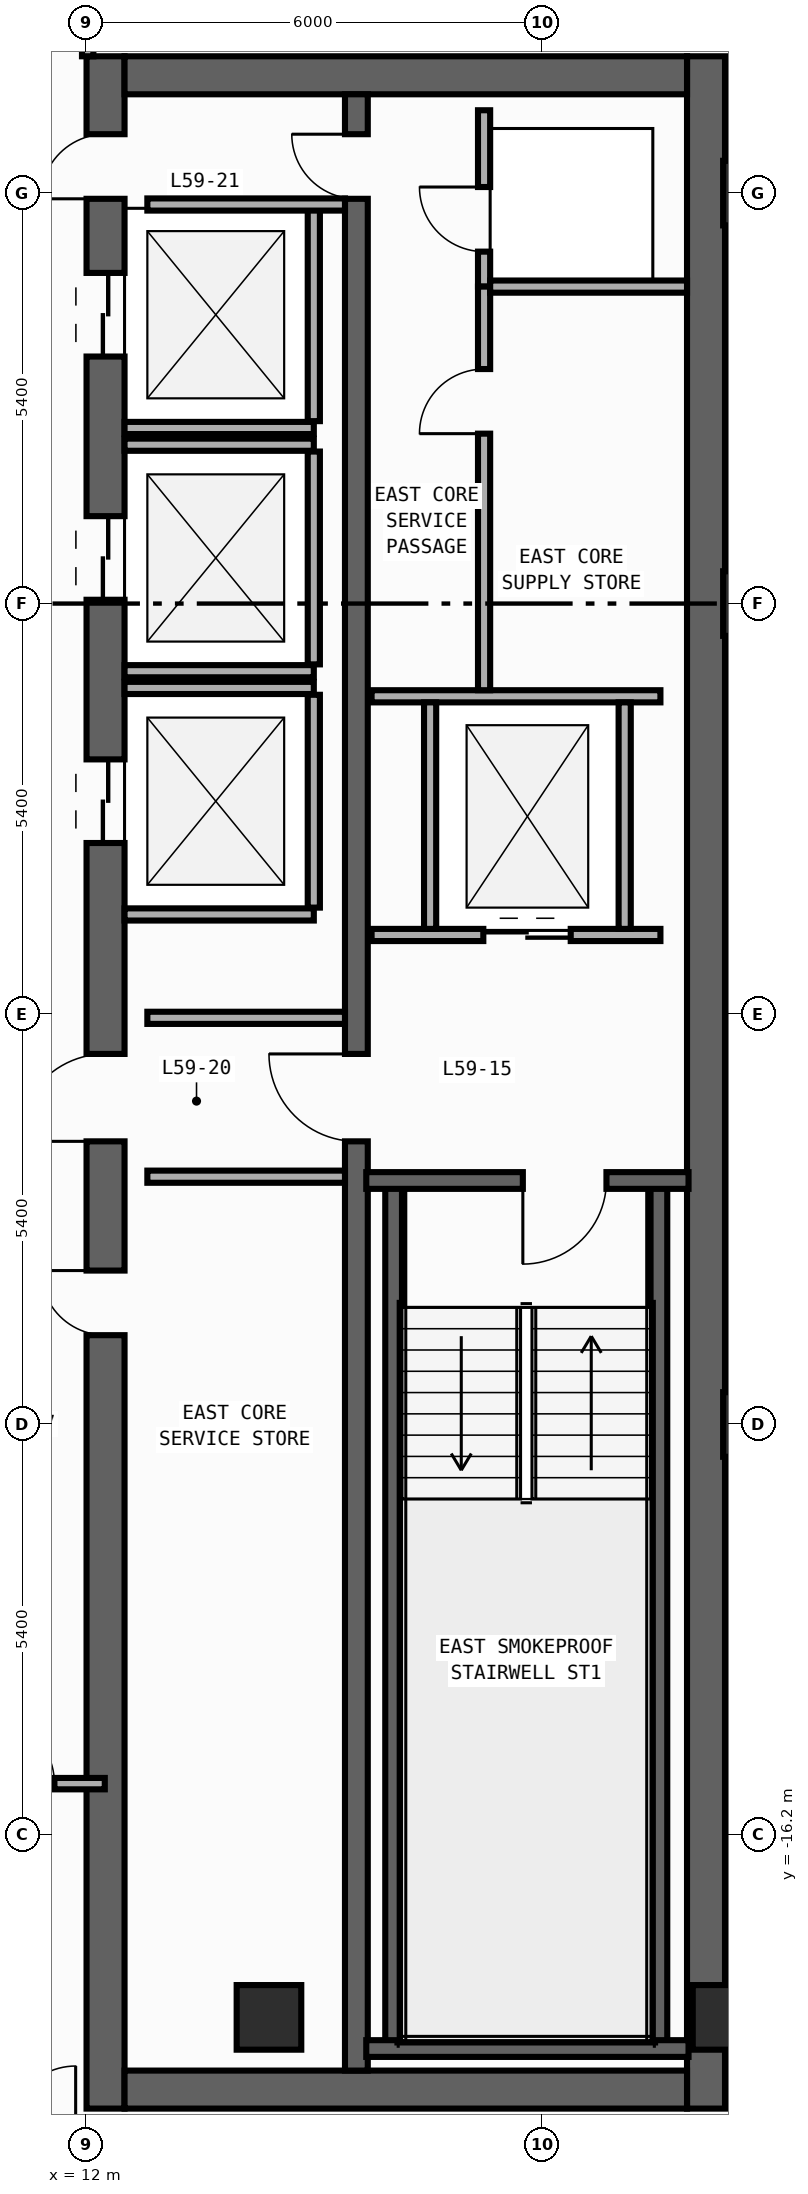
"""IFC4 building model, lengths in metres.
Left out: names, types, materials, properties, quantities, classifications, styles, units other than length and angle.
Written with IfcOpenShell. Run it as: python <this file> out.ifc"""

import sys

from ifc_helpers import new_model, si_unit, direction, frame, frame_2d, origin, origin_2d, place, context, subcontext, project, spatial, rectangle, extrude, element, fill, save


model = new_model("IFC4")
c1 = context("Model", 3, precision=1e-05, world=origin(), true_north=direction((0.0, 1.0)))
c2 = subcontext(c1, "Body", "Model", "MODEL_VIEW")
j1 = project(units=[si_unit("LENGTHUNIT", "METRE"), si_unit("PLANEANGLEUNIT", "RADIAN")], contexts=[c1])
p1 = place(None, origin())
s1 = spatial("IfcSite", under=j1, at=p1, CompositionType="ELEMENT")
p2 = place(p1, origin())
s2 = spatial("IfcBuilding", under=s1, at=p2, CompositionType="ELEMENT")
p3 = place(p2, frame((0.0, 0.0, 251.2)))
s3 = spatial("IfcBuildingStorey", under=s2, at=p3, CompositionType="ELEMENT", Elevation=251.2)
p4 = place(p3, frame((12.25, -19.8, 0.0), z_axis=(0.0, 0.0, 1.0), x_axis=(0.0, 1.0, 0.0)))
e1 = element("IfcWall", 1, at=p4, inside=s3, PredefinedType="SHEAR", context=c2, shape_type="SweptSolid", body=[
    extrude(rectangle(XDim=27.0, YDim=0.5, at=frame_2d((13.5, 0.0))), origin(), (0.0, 0.0, 1.0), 3.34),
])
p5 = place(p4, frame((23.05, 0.0, 0.0)))
e2 = element("IfcOpeningElement", 2, at=p5, cuts=e1, PredefinedType="OPENING", context=c2, shape_type="SweptSolid", body=[
    extrude(rectangle(XDim=1.1, YDim=2.2, at=frame_2d((0.55, 1.1))), frame((0.0, 0.26, 0.0), z_axis=(0.0, -1.0, 0.0), x_axis=(1.0, 0.0, 0.0)), (0.0, 0.0, 1.0), 0.52),
])
p6 = place(p4, frame((19.85, 0.0, 0.0)))
e3 = element("IfcOpeningElement", 3, at=p6, cuts=e1, PredefinedType="OPENING", context=c2, shape_type="SweptSolid", body=[
    extrude(rectangle(XDim=1.1, YDim=2.2, at=frame_2d((0.55, 1.1))), frame((0.0, 0.26, 0.0), z_axis=(0.0, -1.0, 0.0), x_axis=(1.0, 0.0, 0.0)), (0.0, 0.0, 1.0), 0.52),
])
p7 = place(p4, frame((16.65, 0.0, 0.0)))
e4 = element("IfcOpeningElement", 4, at=p7, cuts=e1, PredefinedType="OPENING", context=c2, shape_type="SweptSolid", body=[
    extrude(rectangle(XDim=1.1, YDim=2.2, at=frame_2d((0.55, 1.1))), frame((0.0, 0.26, 0.0), z_axis=(0.0, -1.0, 0.0), x_axis=(1.0, 0.0, 0.0)), (0.0, 0.0, 1.0), 0.52),
])
p8 = place(p4, frame((10.175, 0.0, 0.0)))
e5 = element("IfcOpeningElement", 5, at=p8, cuts=e1, PredefinedType="OPENING", context=c2, shape_type="SweptSolid", body=[
    extrude(rectangle(XDim=0.85, YDim=2.1, at=frame_2d((0.425, 1.05))), frame((0.0, 0.26, 0.0), z_axis=(0.0, -1.0, 0.0), x_axis=(1.0, 0.0, 0.0)), (0.0, 0.0, 1.0), 0.52),
])
p9 = place(p4, frame((12.725, 0.0, 0.0)))
e6 = element("IfcOpeningElement", 6, at=p9, cuts=e1, PredefinedType="OPENING", context=c2, shape_type="SweptSolid", body=[
    extrude(rectangle(XDim=1.15, YDim=2.2, at=frame_2d((0.575, 1.1))), frame((0.0, 0.26, 0.0), z_axis=(0.0, -1.0, 0.0), x_axis=(1.0, 0.0, 0.0)), (0.0, 0.0, 1.0), 0.52),
])
p10 = place(p4, frame((25.125, 0.0, 0.0)))
e7 = element("IfcOpeningElement", 7, at=p10, cuts=e1, PredefinedType="OPENING", context=c2, shape_type="SweptSolid", body=[
    extrude(rectangle(XDim=0.85, YDim=2.1, at=frame_2d((0.425, 1.05))), frame((0.0, 0.26, 0.0), z_axis=(0.0, -1.0, 0.0), x_axis=(1.0, 0.0, 0.0)), (0.0, 0.0, 1.0), 0.52),
])
p11 = place(p3, frame((20.15, -19.8, 0.0), z_axis=(0.0, 0.0, 1.0), x_axis=(0.0, 1.0, 0.0)))
e8 = element("IfcWall", 8, at=p11, inside=s3, PredefinedType="SHEAR", context=c2, shape_type="SweptSolid", body=[
    extrude(rectangle(XDim=27.0, YDim=0.5, at=frame_2d((13.5, 0.0))), origin(), (0.0, 0.0, 1.0), 3.34),
])
for number, where, z_axis, x_axis in (
    (9, (12.5, -19.55, 0.0), (0.0, 0.0, 1.0), (1.0, 0.0, 0.0)),
    (10, (12.5, 6.95, 0.0), (0.0, 0.0, 1.0), (1.0, 0.0, 0.0)),
):
    element("IfcWall", number, at=place(p3, frame(where, z_axis=z_axis, x_axis=x_axis)), inside=s3, PredefinedType="SHEAR", context=c2, shape_type="SweptSolid", body=[
        extrude(rectangle(XDim=7.4, YDim=0.5, at=frame_2d((3.7, 0.0))), origin(), (0.0, 0.0, 1.0), 3.34),
    ])
p12 = place(p3, frame((15.55, -19.3, 0.0), z_axis=(0.0, 0.0, 1.0), x_axis=(0.0, 1.0, 0.0)))
e11 = element("IfcWall", 11, at=p12, inside=s3, PredefinedType="SHEAR", context=c2, shape_type="SweptSolid", body=[
    extrude(rectangle(XDim=26.0, YDim=0.3, at=frame_2d((13.0, 0.0))), origin(), (0.0, 0.0, 1.0), 3.34),
])
p13 = place(p12, frame((12.225, 0.0, 0.0)))
e12 = element("IfcOpeningElement", 12, at=p13, cuts=e11, PredefinedType="OPENING", context=c2, shape_type="SweptSolid", body=[
    extrude(rectangle(XDim=1.15, YDim=2.2, at=frame_2d((0.575, 1.1))), frame((0.0, 0.16, 0.0), z_axis=(0.0, -1.0, 0.0), x_axis=(1.0, 0.0, 0.0)), (0.0, 0.0, 1.0), 0.32),
])
p14 = place(p12, frame((24.625, 0.0, 0.0)))
e13 = element("IfcOpeningElement", 13, at=p14, cuts=e11, PredefinedType="OPENING", context=c2, shape_type="SweptSolid", body=[
    extrude(rectangle(XDim=0.85, YDim=2.1, at=frame_2d((0.425, 1.05))), frame((0.0, 0.16, 0.0), z_axis=(0.0, -1.0, 0.0), x_axis=(1.0, 0.0, 0.0)), (0.0, 0.0, 1.0), 0.32),
])
for number, where, z_axis, x_axis in (
    (14, (16.04, -19.01, 0.0), (0.0, 0.0, 1.0), (0.0, 1.0, 0.0)),
    (15, (19.53, -19.01, 0.0), (0.0, 0.0, 1.0), (0.0, 1.0, 0.0)),
):
    element("IfcWall", number, at=place(p3, frame(where, z_axis=z_axis, x_axis=x_axis)), inside=s3, PredefinedType="SHEAR", context=c2, shape_type="SweptSolid", body=[
        extrude(rectangle(XDim=11.42, YDim=0.22, at=frame_2d((5.71, 0.0))), origin(), (0.0, 0.0, 1.0), 3.34),
    ])
p15 = place(p3, frame((15.68, -19.01, 0.0), z_axis=(0.0, 0.0, 1.0), x_axis=(1.0, 0.0, 0.0)))
e16 = element("IfcWall", 16, at=p15, inside=s3, PredefinedType="SHEAR", context=c2, shape_type="SweptSolid", body=[
    extrude(rectangle(XDim=4.24, YDim=0.22, at=frame_2d((2.12, 0.0))), origin(), (0.0, 0.0, 1.0), 3.34),
])
p16 = place(p3, frame((19.92, -7.59, 0.0), z_axis=(0.0, 0.0, 1.0), x_axis=(-1.0, 0.0, 0.0)))
e17 = element("IfcWall", 17, at=p16, inside=s3, PredefinedType="SHEAR", context=c2, shape_type="SweptSolid", body=[
    extrude(rectangle(XDim=4.24, YDim=0.22, at=frame_2d((2.12, 0.0))), origin(), (0.0, 0.0, 1.0), 3.34),
])
p17 = place(p16, frame((1.08, 0.0, 0.0)))
e18 = element("IfcOpeningElement", 18, at=p17, cuts=e17, PredefinedType="OPENING", context=c2, shape_type="SweptSolid", body=[
    extrude(rectangle(XDim=1.1, YDim=2.2, at=frame_2d((0.55, 1.1))), frame((0.0, 0.12, 0.0), z_axis=(0.0, -1.0, 0.0), x_axis=(1.0, 0.0, 0.0)), (0.0, 0.0, 1.0), 0.24),
])
for number, where, z_axis, x_axis in (
    (19, (20.4, -18.6, 0.0), (0.0, 0.0, 1.0), (1.0, 0.0, 0.0)),
    (20, (14.4, -18.6, 0.0), (0.0, 0.0, 1.0), (1.0, 0.0, 0.0)),
    (21, (20.8, -10.8, 0.0), (0.0, 0.0, 1.0), (1.0, 0.0, 0.0)),
    (22, (20.8, 0.0, 0.0), (0.0, 0.0, 1.0), (1.0, 0.0, 0.0)),
    (23, (20.8, 5.4, 0.0), (0.0, 0.0, 1.0), (1.0, 0.0, 0.0)),
):
    element("IfcColumn", number, at=place(p3, frame(where, z_axis=z_axis, x_axis=x_axis)), inside=s3, PredefinedType="COLUMN", context=c2, shape_type="SweptSolid", body=[
        extrude(rectangle(XDim=0.85, YDim=0.85, at=origin_2d()), origin(), (0.0, 0.0, 1.0), 3.6),
    ])
p18 = place(p3, frame((12.5, 2.31, 0.0), z_axis=(0.0, 0.0, 1.0), x_axis=(1.0, 0.0, 0.0)))
e24 = element("IfcWall", 24, at=p18, inside=s3, PredefinedType="STANDARD", context=c2, shape_type="SweptSolid", body=[
    extrude(rectangle(XDim=2.49, YDim=0.16, at=frame_2d((1.245, 0.0))), origin(), (0.0, 0.0, 1.0), 3.34),
])
p19 = place(p3, frame((14.99, 2.4, 0.0), z_axis=(0.0, 0.0, 1.0), x_axis=(0.0, 1.0, 0.0)))
e25 = element("IfcWall", 25, at=p19, inside=s3, PredefinedType="STANDARD", context=c2, shape_type="SweptSolid", body=[
    extrude(rectangle(XDim=2.8, YDim=0.16, at=frame_2d((1.4, 0.0))), origin(), (0.0, 0.0, 1.0), 3.34),
])
for number, where, z_axis, x_axis in (
    (26, (12.5, -0.89, 0.0), (0.0, 0.0, 1.0), (1.0, 0.0, 0.0)),
    (27, (12.5, 2.09, 0.0), (0.0, 0.0, 1.0), (1.0, 0.0, 0.0)),
):
    element("IfcWall", number, at=place(p3, frame(where, z_axis=z_axis, x_axis=x_axis)), inside=s3, PredefinedType="STANDARD", context=c2, shape_type="SweptSolid", body=[
        extrude(rectangle(XDim=2.49, YDim=0.16, at=frame_2d((1.245, 0.0))), origin(), (0.0, 0.0, 1.0), 3.34),
    ])
p20 = place(p3, frame((14.99, -0.8, 0.0), z_axis=(0.0, 0.0, 1.0), x_axis=(0.0, 1.0, 0.0)))
e28 = element("IfcWall", 28, at=p20, inside=s3, PredefinedType="STANDARD", context=c2, shape_type="SweptSolid", body=[
    extrude(rectangle(XDim=2.8, YDim=0.16, at=frame_2d((1.4, 0.0))), origin(), (0.0, 0.0, 1.0), 3.34),
])
for number, where, z_axis, x_axis in (
    (29, (12.5, -4.09, 0.0), (0.0, 0.0, 1.0), (1.0, 0.0, 0.0)),
    (30, (12.5, -1.11, 0.0), (0.0, 0.0, 1.0), (1.0, 0.0, 0.0)),
):
    element("IfcWall", number, at=place(p3, frame(where, z_axis=z_axis, x_axis=x_axis)), inside=s3, PredefinedType="STANDARD", context=c2, shape_type="SweptSolid", body=[
        extrude(rectangle(XDim=2.49, YDim=0.16, at=frame_2d((1.245, 0.0))), origin(), (0.0, 0.0, 1.0), 3.34),
    ])
p21 = place(p3, frame((14.99, -4.0, 0.0), z_axis=(0.0, 0.0, 1.0), x_axis=(0.0, 1.0, 0.0)))
e31 = element("IfcWall", 31, at=p21, inside=s3, PredefinedType="STANDARD", context=c2, shape_type="SweptSolid", body=[
    extrude(rectangle(XDim=2.8, YDim=0.16, at=frame_2d((1.4, 0.0))), origin(), (0.0, 0.0, 1.0), 3.34),
])
p22 = place(p3, frame((15.75, -4.36, 0.0), z_axis=(0.0, 0.0, 1.0), x_axis=(1.0, 0.0, 0.0)))
e32 = element("IfcWall", 32, at=p22, inside=s3, PredefinedType="STANDARD", context=c2, shape_type="SweptSolid", body=[
    extrude(rectangle(XDim=3.8, YDim=0.16, at=frame_2d((1.9, 0.0))), origin(), (0.0, 0.0, 1.0), 3.34),
])
p23 = place(p22, frame((1.47, 0.0, 0.0)))
e33 = element("IfcOpeningElement", 33, at=p23, cuts=e32, PredefinedType="OPENING", context=c2, shape_type="SweptSolid", body=[
    extrude(rectangle(XDim=1.15, YDim=2.2, at=frame_2d((0.575, 1.1))), frame((0.0, 0.09, 0.0), z_axis=(0.0, -1.0, 0.0), x_axis=(1.0, 0.0, 0.0)), (0.0, 0.0, 1.0), 0.18),
])
p24 = place(p3, frame((15.75, -1.22, 0.0), z_axis=(0.0, 0.0, 1.0), x_axis=(1.0, 0.0, 0.0)))
e34 = element("IfcWall", 34, at=p24, inside=s3, PredefinedType="STANDARD", context=c2, shape_type="SweptSolid", body=[
    extrude(rectangle(XDim=3.8, YDim=0.16, at=frame_2d((1.9, 0.0))), origin(), (0.0, 0.0, 1.0), 3.34),
])
for number, where, z_axis, x_axis in (
    (35, (16.52, -4.28, 0.0), (0.0, 0.0, 1.0), (0.0, 1.0, 0.0)),
    (36, (19.08, -4.28, 0.0), (0.0, 0.0, 1.0), (0.0, 1.0, 0.0)),
):
    element("IfcWall", number, at=place(p3, frame(where, z_axis=z_axis, x_axis=x_axis)), inside=s3, PredefinedType="STANDARD", context=c2, shape_type="SweptSolid", body=[
        extrude(rectangle(XDim=2.98, YDim=0.16, at=frame_2d((1.49, 0.0))), origin(), (0.0, 0.0, 1.0), 3.34),
    ])
for number, where, z_axis, x_axis in (
    (37, (12.8, -5.45, 0.0), (0.0, 0.0, 1.0), (1.0, 0.0, 0.0)),
    (38, (12.8, -7.54, 0.0), (0.0, 0.0, 1.0), (1.0, 0.0, 0.0)),
    (39, (12.8, 5.25, 0.0), (0.0, 0.0, 1.0), (1.0, 0.0, 0.0)),
):
    element("IfcWall", number, at=place(p3, frame(where, z_axis=z_axis, x_axis=x_axis)), inside=s3, PredefinedType="STANDARD", context=c2, shape_type="SweptSolid", body=[
        extrude(rectangle(XDim=2.6, YDim=0.16, at=frame_2d((1.3, 0.0))), origin(), (0.0, 0.0, 1.0), 3.34),
    ])
p25 = place(p3, frame((17.23, 4.17, 0.0), z_axis=(0.0, 0.0, 1.0), x_axis=(0.0, 1.0, 0.0)))
e40 = element("IfcWall", 40, at=p25, inside=s3, PredefinedType="PARTITIONING", context=c2, shape_type="SweptSolid", body=[
    extrude(rectangle(XDim=2.32, YDim=0.16, at=frame_2d((1.16, 0.0))), origin(), (0.0, 0.0, 1.0), 3.34),
])
p26 = place(p25, frame((0.46, 0.0, 0.0)))
e41 = element("IfcOpeningElement", 41, at=p26, cuts=e40, PredefinedType="OPENING", context=c2, shape_type="SweptSolid", body=[
    extrude(rectangle(XDim=0.85, YDim=2.1, at=frame_2d((0.425, 1.05))), frame((0.0, 0.09, 0.0), z_axis=(0.0, -1.0, 0.0), x_axis=(1.0, 0.0, 0.0)), (0.0, 0.0, 1.0), 0.18),
])
p27 = place(p3, frame((17.23, -1.14, 0.0), z_axis=(0.0, 0.0, 1.0), x_axis=(0.0, 1.0, 0.0)))
e42 = element("IfcWall", 42, at=p27, inside=s3, PredefinedType="PARTITIONING", context=c2, shape_type="SweptSolid", body=[
    extrude(rectangle(XDim=5.31, YDim=0.16, at=frame_2d((2.655, 0.0))), origin(), (0.0, 0.0, 1.0), 3.34),
])
p28 = place(p27, frame((3.375, 0.0, 0.0)))
e43 = element("IfcOpeningElement", 43, at=p28, cuts=e42, PredefinedType="OPENING", context=c2, shape_type="SweptSolid", body=[
    extrude(rectangle(XDim=0.85, YDim=2.1, at=frame_2d((0.425, 1.05))), frame((0.0, 0.09, 0.0), z_axis=(0.0, -1.0, 0.0), x_axis=(1.0, 0.0, 0.0)), (0.0, 0.0, 1.0), 0.18),
])
p29 = place(p3, frame((17.31, 4.17, 0.0), z_axis=(0.0, 0.0, 1.0), x_axis=(1.0, 0.0, 0.0)))
e44 = element("IfcWall", 44, at=p29, inside=s3, PredefinedType="PARTITIONING", context=c2, shape_type="SweptSolid", body=[
    extrude(rectangle(XDim=2.59, YDim=0.16, at=frame_2d((1.295, 0.0))), origin(), (0.0, 0.0, 1.0), 3.34),
])
p30 = place(p3, frame((12.015, 7.2, 0.0), z_axis=(0.0, 0.0, 1.0), x_axis=(0.0, 1.0, 0.0)))
e45 = element("IfcWall", 45, at=p30, inside=s3, PredefinedType="PARTITIONING", context=c2, shape_type="SweptSolid", body=[
    extrude(rectangle(XDim=6.52, YDim=0.15, at=frame_2d((3.26, 0.0))), origin(), (0.0, 0.0, 1.0), 3.34),
])
p31 = place(p30, frame((0.67, 0.0, 0.0)))
e46 = element("IfcOpeningElement", 46, at=p31, cuts=e45, PredefinedType="OPENING", context=c2, shape_type="SweptSolid", body=[
    extrude(rectangle(XDim=0.9, YDim=2.15, at=frame_2d((0.45, 1.075))), frame((0.0, 0.085, 0.0), z_axis=(0.0, -1.0, 0.0), x_axis=(1.0, 0.0, 0.0)), (0.0, 0.0, 1.0), 0.17),
])
p32 = place(p3, frame((8.19, -15.525, 0.0), z_axis=(0.0, 0.0, 1.0), x_axis=(1.0, 0.0, 0.0)))
e47 = element("IfcWall", 47, at=p32, inside=s3, PredefinedType="PARTITIONING", context=c2, shape_type="SweptSolid", body=[
    extrude(rectangle(XDim=4.05, YDim=0.15, at=frame_2d((2.025, 0.0))), origin(), (0.0, 0.0, 1.0), 3.34),
])
p33 = place(p32, frame((2.487, 0.0, 0.0)))
e48 = element("IfcOpeningElement", 48, at=p33, cuts=e47, PredefinedType="OPENING", context=c2, shape_type="SweptSolid", body=[
    extrude(rectangle(XDim=0.9, YDim=2.15, at=frame_2d((0.45, 1.075))), frame((0.0, 0.085, 0.0), z_axis=(0.0, -1.0, 0.0), x_axis=(1.0, 0.0, 0.0)), (0.0, 0.0, 1.0), 0.17),
])
p34 = place(p17, origin())
e49 = element("IfcDoor", 49, at=p34, inside=s3, OperationType="SINGLE_SWING_RIGHT", PredefinedType="DOOR", context=c2, shape_type="SweptSolid", body=[
    extrude(rectangle(XDim=1.1, YDim=2.2, at=frame_2d((0.55, 1.1))), frame((0.0, 0.025, 0.0), z_axis=(0.0, -1.0, 0.0), x_axis=(1.0, 0.0, 0.0)), (0.0, 0.0, 1.0), 0.05),
])
fill(e18, e49)
p35 = place(p5, origin())
e50 = element("IfcDoor", 50, at=p35, inside=s3, OperationType="DOUBLE_DOOR_SLIDING", PredefinedType="DOOR", context=c2, shape_type="SweptSolid", body=[
    extrude(rectangle(XDim=1.1, YDim=2.2, at=frame_2d((0.55, 1.1))), frame((0.0, 0.025, 0.0), z_axis=(0.0, -1.0, 0.0), x_axis=(1.0, 0.0, 0.0)), (0.0, 0.0, 1.0), 0.05),
])
fill(e2, e50)
p36 = place(p6, origin())
e51 = element("IfcDoor", 51, at=p36, inside=s3, OperationType="DOUBLE_DOOR_SLIDING", PredefinedType="DOOR", context=c2, shape_type="SweptSolid", body=[
    extrude(rectangle(XDim=1.1, YDim=2.2, at=frame_2d((0.55, 1.1))), frame((0.0, 0.025, 0.0), z_axis=(0.0, -1.0, 0.0), x_axis=(1.0, 0.0, 0.0)), (0.0, 0.0, 1.0), 0.05),
])
fill(e3, e51)
p37 = place(p7, origin())
e52 = element("IfcDoor", 52, at=p37, inside=s3, OperationType="DOUBLE_DOOR_SLIDING", PredefinedType="DOOR", context=c2, shape_type="SweptSolid", body=[
    extrude(rectangle(XDim=1.1, YDim=2.2, at=frame_2d((0.55, 1.1))), frame((0.0, 0.025, 0.0), z_axis=(0.0, -1.0, 0.0), x_axis=(1.0, 0.0, 0.0)), (0.0, 0.0, 1.0), 0.05),
])
fill(e4, e52)
p38 = place(p8, origin())
e53 = element("IfcDoor", 53, at=p38, inside=s3, OperationType="SINGLE_SWING_RIGHT", PredefinedType="DOOR", context=c2, shape_type="SweptSolid", body=[
    extrude(rectangle(XDim=0.85, YDim=2.1, at=frame_2d((0.425, 1.05))), frame((0.0, 0.025, 0.0), z_axis=(0.0, -1.0, 0.0), x_axis=(1.0, 0.0, 0.0)), (0.0, 0.0, 1.0), 0.05),
])
fill(e5, e53)
p39 = place(p9, origin())
e54 = element("IfcDoor", 54, at=p39, inside=s3, OperationType="SINGLE_SWING_LEFT", PredefinedType="DOOR", context=c2, shape_type="SweptSolid", body=[
    extrude(rectangle(XDim=1.15, YDim=2.2, at=frame_2d((0.575, 1.1))), frame((0.0, 0.025, 0.0), z_axis=(0.0, -1.0, 0.0), x_axis=(1.0, 0.0, 0.0)), (0.0, 0.0, 1.0), 0.05),
])
fill(e6, e54)
p40 = place(p13, origin())
e55 = element("IfcDoor", 55, at=p40, inside=s3, OperationType="SINGLE_SWING_RIGHT", PredefinedType="DOOR", context=c2, shape_type="SweptSolid", body=[
    extrude(rectangle(XDim=1.15, YDim=2.2, at=frame_2d((0.575, 1.1))), frame((0.0, 0.025, 0.0), z_axis=(0.0, -1.0, 0.0), x_axis=(1.0, 0.0, 0.0)), (0.0, 0.0, 1.0), 0.05),
])
fill(e12, e55)
p41 = place(p10, origin())
e56 = element("IfcDoor", 56, at=p41, inside=s3, OperationType="SINGLE_SWING_LEFT", PredefinedType="DOOR", context=c2, shape_type="SweptSolid", body=[
    extrude(rectangle(XDim=0.85, YDim=2.1, at=frame_2d((0.425, 1.05))), frame((0.0, 0.025, 0.0), z_axis=(0.0, -1.0, 0.0), x_axis=(1.0, 0.0, 0.0)), (0.0, 0.0, 1.0), 0.05),
])
fill(e7, e56)
p42 = place(p14, origin())
e57 = element("IfcDoor", 57, at=p42, inside=s3, OperationType="SINGLE_SWING_RIGHT", PredefinedType="DOOR", context=c2, shape_type="SweptSolid", body=[
    extrude(rectangle(XDim=0.85, YDim=2.1, at=frame_2d((0.425, 1.05))), frame((0.0, 0.025, 0.0), z_axis=(0.0, -1.0, 0.0), x_axis=(1.0, 0.0, 0.0)), (0.0, 0.0, 1.0), 0.05),
])
fill(e13, e57)
p43 = place(p23, origin())
e58 = element("IfcDoor", 58, at=p43, inside=s3, OperationType="DOUBLE_DOOR_SLIDING", PredefinedType="DOOR", context=c2, shape_type="SweptSolid", body=[
    extrude(rectangle(XDim=1.15, YDim=2.2, at=frame_2d((0.575, 1.1))), frame((0.0, 0.025, 0.0), z_axis=(0.0, -1.0, 0.0), x_axis=(1.0, 0.0, 0.0)), (0.0, 0.0, 1.0), 0.05),
])
fill(e33, e58)
p44 = place(p26, origin())
e59 = element("IfcDoor", 59, at=p44, inside=s3, OperationType="SINGLE_SWING_RIGHT", PredefinedType="DOOR", context=c2, shape_type="SweptSolid", body=[
    extrude(rectangle(XDim=0.85, YDim=2.1, at=frame_2d((0.425, 1.05))), frame((0.0, 0.025, 0.0), z_axis=(0.0, -1.0, 0.0), x_axis=(1.0, 0.0, 0.0)), (0.0, 0.0, 1.0), 0.05),
])
fill(e41, e59)
p45 = place(p28, origin())
e60 = element("IfcDoor", 60, at=p45, inside=s3, OperationType="SINGLE_SWING_LEFT", PredefinedType="DOOR", context=c2, shape_type="SweptSolid", body=[
    extrude(rectangle(XDim=0.85, YDim=2.1, at=frame_2d((0.425, 1.05))), frame((0.0, 0.025, 0.0), z_axis=(0.0, -1.0, 0.0), x_axis=(1.0, 0.0, 0.0)), (0.0, 0.0, 1.0), 0.05),
])
fill(e43, e60)
p46 = place(p33, origin())
e61 = element("IfcDoor", 61, at=p46, inside=s3, OperationType="SINGLE_SWING_LEFT", PredefinedType="DOOR", context=c2, shape_type="SweptSolid", body=[
    extrude(rectangle(XDim=0.9, YDim=2.15, at=frame_2d((0.45, 1.075))), frame((0.0, 0.025, 0.0), z_axis=(0.0, -1.0, 0.0), x_axis=(1.0, 0.0, 0.0)), (0.0, 0.0, 1.0), 0.05),
])
fill(e48, e61)
save(model, sys.argv[1])
